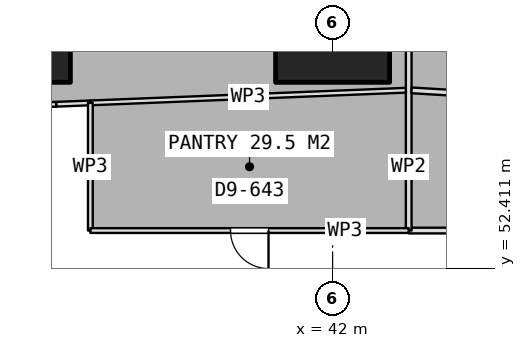
"""IFC4 building model, lengths in metres.
Left out: names, types, materials, properties, quantities, classifications, styles, units other than length and angle.
Written with IfcOpenShell. Run it as: python <this file> out.ifc"""

import sys

from ifc_helpers import new_model, si_unit, direction, frame, frame_2d, origin, origin_2d, place, context, subcontext, project, spatial, rectangle, extrude, element, fill, save


model = new_model("IFC4")
c1 = context("Model", 3, precision=1e-05, world=origin(), true_north=direction((0.0, 1.0)))
c2 = subcontext(c1, "Body", "Model", "MODEL_VIEW")
j1 = project(units=[si_unit("LENGTHUNIT", "METRE"), si_unit("PLANEANGLEUNIT", "RADIAN")], contexts=[c1])
p1 = place(None, origin())
s1 = spatial("IfcSite", under=j1, at=p1, CompositionType="ELEMENT")
p2 = place(p1, origin())
s2 = spatial("IfcBuilding", under=s1, at=p2, CompositionType="ELEMENT")
p3 = place(p2, frame((0.0, 0.0, 155.3)))
s3 = spatial("IfcBuildingStorey", under=s2, at=p3, CompositionType="ELEMENT", Elevation=155.3)
for number, where, z_axis, x_axis in (
    (1, (33.6, 58.8, 0.0), (0.0, 0.0, 1.0), (1.0, 0.0, 0.0)),
    (2, (42.0, 58.8, 0.0), (0.0, 0.0, 1.0), (1.0, 0.0, 0.0)),
):
    element("IfcColumn", number, at=place(p3, frame(where, z_axis=z_axis, x_axis=x_axis)), inside=s3, PredefinedType="COLUMN", context=c2, shape_type="SweptSolid", body=[
        extrude(rectangle(XDim=3.0, YDim=3.0, at=origin_2d()), origin(), (0.0, 0.0, 1.0), 3.75),
    ])
p4 = place(p3, frame((53.4, 53.4, 0.0), z_axis=(0.0, 0.0, 1.0), x_axis=(-1.0, 0.0, 0.0)))
e3 = element("IfcWall", 3, at=p4, inside=s3, PredefinedType="PARTITIONING", context=c2, shape_type="SweptSolid", body=[
    extrude(rectangle(XDim=9.397, YDim=0.15, at=frame_2d((4.698, 0.0))), origin(), (0.0, 0.0, 1.0), 3.5),
])
p5 = place(p3, frame((44.003, 53.4, 0.0), z_axis=(0.0, 0.0, 1.0), x_axis=(0.0, 1.0, 0.0)))
e4 = element("IfcWall", 4, at=p5, inside=s3, PredefinedType="PARTITIONING", context=c2, shape_type="SweptSolid", body=[
    extrude(rectangle(XDim=8.419, YDim=0.15, at=frame_2d((4.209, 0.0))), origin(), (0.0, 0.0, 1.0), 3.5),
])
p6 = place(p3, frame((44.078, 57.089, 0.0), z_axis=(0.0, 0.0, 1.0), x_axis=(0.998195111132, -0.060054309681, 0.0)))
e5 = element("IfcWall", 5, at=p6, inside=s3, PredefinedType="PARTITIONING", context=c2, shape_type="SweptSolid", body=[
    extrude(rectangle(XDim=8.078, YDim=0.15, at=frame_2d((4.039, 0.0))), origin(), (0.0, 0.0, 1.0), 3.5),
])
p7 = place(p3, frame((43.928, 57.092, 0.0), z_axis=(0.0, 0.0, 1.0), x_axis=(-0.999196493298, -0.040079518214, 0.0)))
e6 = element("IfcWall", 6, at=p7, inside=s3, PredefinedType="PARTITIONING", context=c2, shape_type="SweptSolid", body=[
    extrude(rectangle(XDim=8.309, YDim=0.125, at=frame_2d((4.154, 0.0))), origin(), (0.0, 0.0, 1.0), 3.5),
])
p8 = place(p3, frame((35.626, 56.759, 0.0), z_axis=(0.0, 0.0, 1.0), x_axis=(-0.999194884772, -0.04011959928, 0.0)))
e7 = element("IfcWall", 7, at=p8, inside=s3, PredefinedType="PARTITIONING", context=c2, shape_type="SweptSolid", body=[
    extrude(rectangle(XDim=0.901, YDim=0.125, at=frame_2d((0.45, 0.0))), origin(), (0.0, 0.0, 1.0), 3.5),
])
p9 = place(p3, frame((34.726, 56.723, 0.0), z_axis=(0.0, 0.0, 1.0), x_axis=(-0.999191974856, -0.040192006472, 0.0)))
e8 = element("IfcWall", 8, at=p9, inside=s3, PredefinedType="PARTITIONING", context=c2, shape_type="SweptSolid", body=[
    extrude(rectangle(XDim=0.522, YDim=0.125, at=frame_2d((0.261, 0.0))), origin(), (0.0, 0.0, 1.0), 3.5),
])
p10 = place(p3, frame((35.626, 53.4, 0.0), z_axis=(0.0, 0.0, 1.0), x_axis=(0.0, 1.0, 0.0)))
e9 = element("IfcWall", 9, at=p10, inside=s3, PredefinedType="PARTITIONING", context=c2, shape_type="SweptSolid", body=[
    extrude(rectangle(XDim=3.359, YDim=0.125, at=frame_2d((1.68, 0.0))), origin(), (0.0, 0.0, 1.0), 3.5),
])
p11 = place(p3, frame((44.003, 53.4, 0.0), z_axis=(0.0, 0.0, 1.0), x_axis=(-1.0, 0.0, 0.0)))
e10 = element("IfcWall", 10, at=p11, inside=s3, PredefinedType="PARTITIONING", context=c2, shape_type="SweptSolid", body=[
    extrude(rectangle(XDim=8.377, YDim=0.125, at=frame_2d((4.188, 0.0))), origin(), (0.0, 0.0, 1.0), 3.5),
])
p12 = place(p11, frame((3.689, 0.0, 0.0)))
e11 = element("IfcOpeningElement", 11, at=p12, cuts=e10, PredefinedType="OPENING", context=c2, shape_type="SweptSolid", body=[
    extrude(rectangle(XDim=1.0, YDim=2.1, at=frame_2d((0.5, 1.05))), frame((0.0, 0.073, 0.0), z_axis=(0.0, -1.0, 0.0), x_axis=(1.0, 0.0, 0.0)), (0.0, 0.0, 1.0), 0.145),
])
p13 = place(p12, origin())
e12 = element("IfcDoor", 12, at=p13, inside=s3, OperationType="SINGLE_SWING_LEFT", PredefinedType="DOOR", context=c2, shape_type="SweptSolid", body=[
    extrude(rectangle(XDim=1.0, YDim=2.1, at=frame_2d((0.5, 1.05))), frame((0.0, 0.025, 0.0), z_axis=(0.0, -1.0, 0.0), x_axis=(1.0, 0.0, 0.0)), (0.0, 0.0, 1.0), 0.05),
])
fill(e11, e12)
save(model, sys.argv[1])
